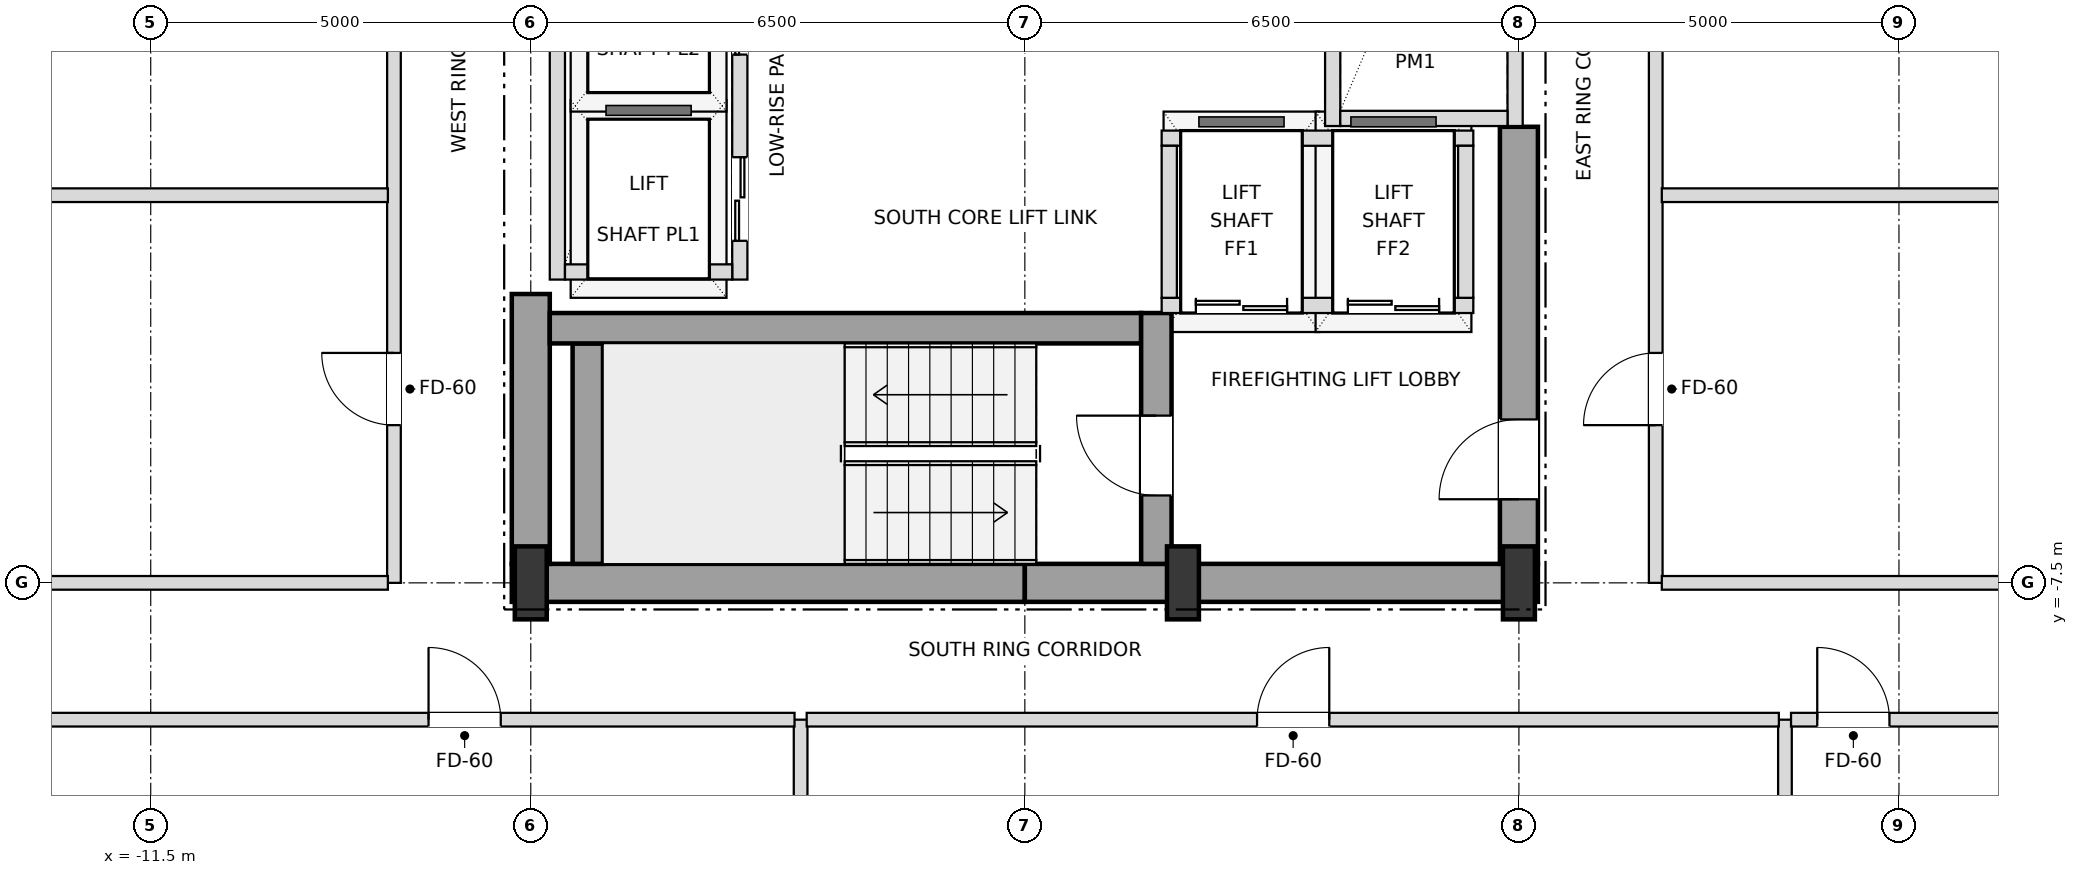
"""IFC4 building model, lengths in metres.
Left out: names, types, materials, properties, quantities, classifications, styles, units other than length and angle.
Written with IfcOpenShell. Run it as: python <this file> out.ifc"""

import sys

from ifc_helpers import new_model, si_unit, direction, frame, frame_2d, origin, origin_2d, place, context, subcontext, project, spatial, rectangle, i_section, extrude, element, fill, save


model = new_model("IFC4")
c1 = context("Model", 3, precision=1e-05, world=origin(), true_north=direction((0.0, 1.0)))
c2 = subcontext(c1, "Body", "Model", "MODEL_VIEW")
j1 = project(units=[si_unit("LENGTHUNIT", "METRE"), si_unit("PLANEANGLEUNIT", "RADIAN")], contexts=[c1])
p1 = place(None, origin())
s1 = spatial("IfcSite", under=j1, at=p1, CompositionType="ELEMENT")
p2 = place(p1, origin())
s2 = spatial("IfcBuilding", under=s1, at=p2, CompositionType="ELEMENT")
p3 = place(p2, frame((0.0, 0.0, 79.2)))
s3 = spatial("IfcBuildingStorey", under=s2, at=p3, CompositionType="ELEMENT", Elevation=79.2)
for number, where, z_axis, x_axis in (
    (1, (-6.5, -7.5, 0.0), (0.0, 0.0, 1.0), (1.0, 0.0, 0.0)),
    (2, (2.08, -7.5, 0.0), (0.0, 0.0, 1.0), (1.0, 0.0, 0.0)),
    (3, (6.5, -7.5, 0.0), (0.0, 0.0, 1.0), (1.0, 0.0, 0.0)),
):
    element("IfcColumn", number, at=place(p3, frame(where, z_axis=z_axis, x_axis=x_axis)), inside=s3, PredefinedType="COLUMN", context=c2, shape_type="SweptSolid", body=[
        extrude(i_section(OverallWidth=0.42, OverallDepth=0.96, WebThickness=0.022, FlangeThickness=0.034, at=origin_2d()), origin(), (0.0, 0.0, 1.0), 3.6),
    ])
for number, where, z_axis, x_axis in (
    (4, (-6.75, -7.5, 0.0), (0.0, 0.0, 1.0), (1.0, 0.0, 0.0)),
    (5, (0.0, -7.5, 0.0), (0.0, 0.0, 1.0), (1.0, 0.0, 0.0)),
):
    element("IfcWall", number, at=place(p3, frame(where, z_axis=z_axis, x_axis=x_axis)), inside=s3, PredefinedType="SHEAR", context=c2, shape_type="SweptSolid", body=[
        extrude(rectangle(XDim=6.75, YDim=0.5, at=frame_2d((3.375, 0.0))), origin(), (0.0, 0.0, 1.0), 3.38),
    ])
p4 = place(p3, frame((-6.5, -7.25, 0.0), z_axis=(0.0, 0.0, 1.0), x_axis=(0.0, 1.0, 0.0)))
e6 = element("IfcWall", 6, at=p4, inside=s3, PredefinedType="SHEAR", context=c2, shape_type="SweptSolid", body=[
    extrude(rectangle(XDim=3.55, YDim=0.5, at=frame_2d((1.775, 0.0))), origin(), (0.0, 0.0, 1.0), 3.38),
])
p5 = place(p3, frame((6.5, -7.25, 0.0), z_axis=(0.0, 0.0, 1.0), x_axis=(0.0, 1.0, 0.0)))
e7 = element("IfcWall", 7, at=p5, inside=s3, PredefinedType="SHEAR", context=c2, shape_type="SweptSolid", body=[
    extrude(rectangle(XDim=5.75, YDim=0.5, at=frame_2d((2.875, 0.0))), origin(), (0.0, 0.0, 1.0), 3.38),
])
p6 = place(p5, frame((0.85, 0.0, 0.0)))
e8 = element("IfcOpeningElement", 8, at=p6, cuts=e7, PredefinedType="OPENING", context=c2, shape_type="SweptSolid", body=[
    extrude(rectangle(XDim=1.05, YDim=2.15, at=frame_2d((0.525, 1.075))), frame((0.0, 0.26, 0.0), z_axis=(0.0, -1.0, 0.0), x_axis=(1.0, 0.0, 0.0)), (0.0, 0.0, 1.0), 0.52),
])
p7 = place(p3, frame((-5.75, -7.25, 0.0), z_axis=(0.0, 0.0, 1.0), x_axis=(0.0, 1.0, 0.0)))
e9 = element("IfcWall", 9, at=p7, inside=s3, PredefinedType="SHEAR", context=c2, shape_type="SweptSolid", body=[
    extrude(rectangle(XDim=2.9, YDim=0.4, at=frame_2d((1.45, 0.0))), origin(), (0.0, 0.0, 1.0), 3.38),
])
p8 = place(p3, frame((-6.25, -4.15, 0.0), z_axis=(0.0, 0.0, 1.0), x_axis=(1.0, 0.0, 0.0)))
e10 = element("IfcWall", 10, at=p8, inside=s3, PredefinedType="SHEAR", context=c2, shape_type="SweptSolid", body=[
    extrude(rectangle(XDim=7.78, YDim=0.4, at=frame_2d((3.89, 0.0))), origin(), (0.0, 0.0, 1.0), 3.38),
])
p9 = place(p3, frame((1.73, -7.25, 0.0), z_axis=(0.0, 0.0, 1.0), x_axis=(0.0, 1.0, 0.0)))
e11 = element("IfcWall", 11, at=p9, inside=s3, PredefinedType="SHEAR", context=c2, shape_type="SweptSolid", body=[
    extrude(rectangle(XDim=3.3, YDim=0.4, at=frame_2d((1.65, 0.0))), origin(), (0.0, 0.0, 1.0), 3.38),
])
p10 = place(p9, frame((0.9, 0.0, 0.0)))
e12 = element("IfcOpeningElement", 12, at=p10, cuts=e11, PredefinedType="OPENING", context=c2, shape_type="SweptSolid", body=[
    extrude(rectangle(XDim=1.05, YDim=2.15, at=frame_2d((0.525, 1.075))), frame((0.0, 0.21, 0.0), z_axis=(0.0, -1.0, 0.0), x_axis=(1.0, 0.0, 0.0)), (0.0, 0.0, 1.0), 0.42),
])
p11 = place(p3, frame((-3.75, -3.51, 0.0), z_axis=(0.0, 0.0, 1.0), x_axis=(0.0, 1.0, 0.0)))
e13 = element("IfcWall", 13, at=p11, inside=s3, PredefinedType="SOLIDWALL", context=c2, shape_type="SweptSolid", body=[
    extrude(rectangle(XDim=7.02, YDim=0.2, at=frame_2d((3.51, 0.0))), origin(), (0.0, 0.0, 1.0), 3.38),
])
p12 = place(p11, frame((0.51, 0.0, 0.0)))
e14 = element("IfcOpeningElement", 14, at=p12, cuts=e13, PredefinedType="OPENING", context=c2, shape_type="SweptSolid", body=[
    extrude(rectangle(XDim=1.1, YDim=2.15, at=frame_2d((0.55, 1.075))), frame((0.0, 0.11, 0.0), z_axis=(0.0, -1.0, 0.0), x_axis=(1.0, 0.0, 0.0)), (0.0, 0.0, 1.0), 0.22),
])
p13 = place(p11, frame((2.96, 0.0, 0.0)))
e15 = element("IfcOpeningElement", 15, at=p13, cuts=e13, PredefinedType="OPENING", context=c2, shape_type="SweptSolid", body=[
    extrude(rectangle(XDim=1.1, YDim=2.15, at=frame_2d((0.55, 1.075))), frame((0.0, 0.11, 0.0), z_axis=(0.0, -1.0, 0.0), x_axis=(1.0, 0.0, 0.0)), (0.0, 0.0, 1.0), 0.22),
])
p14 = place(p11, frame((5.41, 0.0, 0.0)))
e16 = element("IfcOpeningElement", 16, at=p14, cuts=e13, PredefinedType="OPENING", context=c2, shape_type="SweptSolid", body=[
    extrude(rectangle(XDim=1.1, YDim=2.15, at=frame_2d((0.55, 1.075))), frame((0.0, 0.11, 0.0), z_axis=(0.0, -1.0, 0.0), x_axis=(1.0, 0.0, 0.0)), (0.0, 0.0, 1.0), 0.22),
])
p15 = place(p3, frame((-6.15, -3.51, 0.0), z_axis=(0.0, 0.0, 1.0), x_axis=(0.0, 1.0, 0.0)))
e17 = element("IfcWall", 17, at=p15, inside=s3, PredefinedType="SOLIDWALL", context=c2, shape_type="SweptSolid", body=[
    extrude(rectangle(XDim=7.02, YDim=0.2, at=frame_2d((3.51, 0.0))), origin(), (0.0, 0.0, 1.0), 3.38),
])
p16 = place(p3, frame((-6.05, -3.41, 0.0), z_axis=(0.0, 0.0, 1.0), x_axis=(1.0, 0.0, 0.0)))
e18 = element("IfcWall", 18, at=p16, inside=s3, PredefinedType="SOLIDWALL", context=c2, shape_type="SweptSolid", body=[
    extrude(rectangle(XDim=2.2, YDim=0.2, at=frame_2d((1.1, 0.0))), origin(), (0.0, 0.0, 1.0), 3.38),
])
p17 = place(p3, frame((4.05, -1.49, 0.0), z_axis=(0.0, 0.0, 1.0), x_axis=(0.0, 1.0, 0.0)))
e19 = element("IfcWall", 19, at=p17, inside=s3, PredefinedType="SOLIDWALL", context=c2, shape_type="SweptSolid", body=[
    extrude(rectangle(XDim=5.58, YDim=0.2, at=frame_2d((2.79, 0.0))), origin(), (0.0, 0.0, 1.0), 3.38),
])
p18 = place(p3, frame((6.45, -1.49, 0.0), z_axis=(0.0, 0.0, 1.0), x_axis=(0.0, 1.0, 0.0)))
e20 = element("IfcWall", 20, at=p18, inside=s3, PredefinedType="SOLIDWALL", context=c2, shape_type="SweptSolid", body=[
    extrude(rectangle(XDim=5.58, YDim=0.2, at=frame_2d((2.79, 0.0))), origin(), (0.0, 0.0, 1.0), 2.816),
])
p19 = place(p3, frame((4.15, -1.39, 0.0), z_axis=(0.0, 0.0, 1.0), x_axis=(1.0, 0.0, 0.0)))
e21 = element("IfcWall", 21, at=p19, inside=s3, PredefinedType="SOLIDWALL", context=c2, shape_type="SweptSolid", body=[
    extrude(rectangle(XDim=2.2, YDim=0.2, at=frame_2d((1.1, 0.0))), origin(), (0.0, 0.0, 1.0), 3.38),
])
p20 = place(p3, frame((1.8, -3.85, 0.0), z_axis=(0.0, 0.0, 1.0), x_axis=(1.0, 0.0, 0.0)))
e22 = element("IfcWall", 22, at=p20, inside=s3, PredefinedType="SOLIDWALL", context=c2, shape_type="SweptSolid", body=[
    extrude(rectangle(XDim=4.1, YDim=0.2, at=frame_2d((2.05, 0.0))), origin(), (0.0, 0.0, 1.0), 3.38),
])
p21 = place(p20, frame((0.45, 0.0, 0.0)))
e23 = element("IfcOpeningElement", 23, at=p21, cuts=e22, PredefinedType="OPENING", context=c2, shape_type="SweptSolid", body=[
    extrude(rectangle(XDim=1.2, YDim=2.2, at=frame_2d((0.6, 1.1))), frame((0.0, 0.11, 0.0), z_axis=(0.0, -1.0, 0.0), x_axis=(1.0, 0.0, 0.0)), (0.0, 0.0, 1.0), 0.22),
])
p22 = place(p20, frame((2.45, 0.0, 0.0)))
e24 = element("IfcOpeningElement", 24, at=p22, cuts=e22, PredefinedType="OPENING", context=c2, shape_type="SweptSolid", body=[
    extrude(rectangle(XDim=1.2, YDim=2.2, at=frame_2d((0.6, 1.1))), frame((0.0, 0.11, 0.0), z_axis=(0.0, -1.0, 0.0), x_axis=(1.0, 0.0, 0.0)), (0.0, 0.0, 1.0), 0.22),
])
p23 = place(p3, frame((1.8, -1.65, 0.0), z_axis=(0.0, 0.0, 1.0), x_axis=(1.0, 0.0, 0.0)))
e25 = element("IfcWall", 25, at=p23, inside=s3, PredefinedType="SOLIDWALL", context=c2, shape_type="SweptSolid", body=[
    extrude(rectangle(XDim=4.1, YDim=0.2, at=frame_2d((2.05, 0.0))), origin(), (0.0, 0.0, 1.0), 3.38),
])
for number, where, z_axis, x_axis in (
    (26, (1.9, -3.75, 0.0), (0.0, 0.0, 1.0), (0.0, 1.0, 0.0)),
    (27, (5.8, -3.75, 0.0), (0.0, 0.0, 1.0), (0.0, 1.0, 0.0)),
):
    element("IfcWall", number, at=place(p3, frame(where, z_axis=z_axis, x_axis=x_axis)), inside=s3, PredefinedType="SOLIDWALL", context=c2, shape_type="SweptSolid", body=[
        extrude(rectangle(XDim=2.0, YDim=0.2, at=frame_2d((1.0, 0.0))), origin(), (0.0, 0.0, 1.0), 3.38),
    ])
p24 = place(p3, frame((-8.3, -7.5, 0.0), z_axis=(0.0, 0.0, 1.0), x_axis=(0.0, 1.0, 0.0)))
e28 = element("IfcWall", 28, at=p24, inside=s3, PredefinedType="PARTITIONING", context=c2, shape_type="SweptSolid", body=[
    extrude(rectangle(XDim=15.0, YDim=0.18, at=frame_2d((7.5, 0.0))), origin(), (0.0, 0.0, 1.0), 3.38),
])
p25 = place(p24, frame((2.075, 0.0, 0.0)))
e29 = element("IfcOpeningElement", 29, at=p25, cuts=e28, PredefinedType="OPENING", context=c2, shape_type="SweptSolid", body=[
    extrude(rectangle(XDim=0.95, YDim=2.15, at=frame_2d((0.475, 1.075))), frame((0.0, 0.1, 0.0), z_axis=(0.0, -1.0, 0.0), x_axis=(1.0, 0.0, 0.0)), (0.0, 0.0, 1.0), 0.2),
])
p26 = place(p24, frame((8.475, 0.0, 0.0)))
e30 = element("IfcOpeningElement", 30, at=p26, cuts=e28, PredefinedType="OPENING", context=c2, shape_type="SweptSolid", body=[
    extrude(rectangle(XDim=0.95, YDim=2.15, at=frame_2d((0.475, 1.075))), frame((0.0, 0.1, 0.0), z_axis=(0.0, -1.0, 0.0), x_axis=(1.0, 0.0, 0.0)), (0.0, 0.0, 1.0), 0.2),
])
p27 = place(p24, frame((13.425, 0.0, 0.0)))
e31 = element("IfcOpeningElement", 31, at=p27, cuts=e28, PredefinedType="OPENING", context=c2, shape_type="SweptSolid", body=[
    extrude(rectangle(XDim=0.95, YDim=2.15, at=frame_2d((0.475, 1.075))), frame((0.0, 0.1, 0.0), z_axis=(0.0, -1.0, 0.0), x_axis=(1.0, 0.0, 0.0)), (0.0, 0.0, 1.0), 0.2),
])
p28 = place(p3, frame((-2.95, -24.9, 0.0), z_axis=(0.0, 0.0, 1.0), x_axis=(0.0, 1.0, 0.0)))
e32 = element("IfcWall", 32, at=p28, inside=s3, PredefinedType="PARTITIONING", context=c2, shape_type="SweptSolid", body=[
    extrude(rectangle(XDim=15.6, YDim=0.18, at=frame_2d((7.8, 0.0))), origin(), (0.0, 0.0, 1.0), 2.816),
])
p29 = place(p3, frame((8.3, -7.5, 0.0), z_axis=(0.0, 0.0, 1.0), x_axis=(0.0, 1.0, 0.0)))
e33 = element("IfcWall", 33, at=p29, inside=s3, PredefinedType="PARTITIONING", context=c2, shape_type="SweptSolid", body=[
    extrude(rectangle(XDim=15.0, YDim=0.18, at=frame_2d((7.5, 0.0))), origin(), (0.0, 0.0, 1.0), 3.38),
])
p30 = place(p29, frame((2.075, 0.0, 0.0)))
e34 = element("IfcOpeningElement", 34, at=p30, cuts=e33, PredefinedType="OPENING", context=c2, shape_type="SweptSolid", body=[
    extrude(rectangle(XDim=0.95, YDim=2.15, at=frame_2d((0.475, 1.075))), frame((0.0, 0.1, 0.0), z_axis=(0.0, -1.0, 0.0), x_axis=(1.0, 0.0, 0.0)), (0.0, 0.0, 1.0), 0.2),
])
p31 = place(p29, frame((8.475, 0.0, 0.0)))
e35 = element("IfcOpeningElement", 35, at=p31, cuts=e33, PredefinedType="OPENING", context=c2, shape_type="SweptSolid", body=[
    extrude(rectangle(XDim=0.95, YDim=2.15, at=frame_2d((0.475, 1.075))), frame((0.0, 0.1, 0.0), z_axis=(0.0, -1.0, 0.0), x_axis=(1.0, 0.0, 0.0)), (0.0, 0.0, 1.0), 0.2),
])
p32 = place(p29, frame((13.425, 0.0, 0.0)))
e36 = element("IfcOpeningElement", 36, at=p32, cuts=e33, PredefinedType="OPENING", context=c2, shape_type="SweptSolid", body=[
    extrude(rectangle(XDim=0.95, YDim=2.15, at=frame_2d((0.475, 1.075))), frame((0.0, 0.1, 0.0), z_axis=(0.0, -1.0, 0.0), x_axis=(1.0, 0.0, 0.0)), (0.0, 0.0, 1.0), 0.2),
])
p33 = place(p3, frame((10.0, -24.9, 0.0), z_axis=(0.0, 0.0, 1.0), x_axis=(0.0, 1.0, 0.0)))
e37 = element("IfcWall", 37, at=p33, inside=s3, PredefinedType="PARTITIONING", context=c2, shape_type="SweptSolid", body=[
    extrude(rectangle(XDim=15.6, YDim=0.18, at=frame_2d((7.8, 0.0))), origin(), (0.0, 0.0, 1.0), 2.816),
])
p34 = place(p33, frame((6.015, 0.0, 0.0)))
e38 = element("IfcOpeningElement", 38, at=p34, cuts=e37, PredefinedType="OPENING", context=c2, shape_type="SweptSolid", body=[
    extrude(rectangle(XDim=0.95, YDim=2.15, at=frame_2d((0.475, 1.075))), frame((0.0, 0.1, 0.0), z_axis=(0.0, -1.0, 0.0), x_axis=(1.0, 0.0, 0.0)), (0.0, 0.0, 1.0), 0.2),
])
p35 = place(p3, frame((-18.4, -9.3, 0.0), z_axis=(0.0, 0.0, 1.0), x_axis=(1.0, 0.0, 0.0)))
e39 = element("IfcWall", 39, at=p35, inside=s3, PredefinedType="PARTITIONING", context=c2, shape_type="SweptSolid", body=[
    extrude(rectangle(XDim=15.37, YDim=0.18, at=frame_2d((7.685, 0.0))), origin(), (0.0, 0.0, 1.0), 2.816),
])
p36 = place(p35, frame((10.555, 0.0, 0.0)))
e40 = element("IfcOpeningElement", 40, at=p36, cuts=e39, PredefinedType="OPENING", context=c2, shape_type="SweptSolid", body=[
    extrude(rectangle(XDim=0.95, YDim=2.15, at=frame_2d((0.475, 1.075))), frame((0.0, 0.1, 0.0), z_axis=(0.0, -1.0, 0.0), x_axis=(1.0, 0.0, 0.0)), (0.0, 0.0, 1.0), 0.2),
])
p37 = place(p3, frame((-2.87, -9.3, 0.0), z_axis=(0.0, 0.0, 1.0), x_axis=(1.0, 0.0, 0.0)))
e41 = element("IfcWall", 41, at=p37, inside=s3, PredefinedType="PARTITIONING", context=c2, shape_type="SweptSolid", body=[
    extrude(rectangle(XDim=12.79, YDim=0.18, at=frame_2d((6.395, 0.0))), origin(), (0.0, 0.0, 1.0), 2.816),
])
p38 = place(p37, frame((5.925, 0.0, 0.0)))
e42 = element("IfcOpeningElement", 42, at=p38, cuts=e41, PredefinedType="OPENING", context=c2, shape_type="SweptSolid", body=[
    extrude(rectangle(XDim=0.95, YDim=2.15, at=frame_2d((0.475, 1.075))), frame((0.0, 0.1, 0.0), z_axis=(0.0, -1.0, 0.0), x_axis=(1.0, 0.0, 0.0)), (0.0, 0.0, 1.0), 0.2),
])
p39 = place(p3, frame((10.08, -9.3, 0.0), z_axis=(0.0, 0.0, 1.0), x_axis=(1.0, 0.0, 0.0)))
e43 = element("IfcWall", 43, at=p39, inside=s3, PredefinedType="PARTITIONING", context=c2, shape_type="SweptSolid", body=[
    extrude(rectangle(XDim=8.24, YDim=0.18, at=frame_2d((4.12, 0.0))), origin(), (0.0, 0.0, 1.0), 2.816),
])
p40 = place(p39, frame((0.345, 0.0, 0.0)))
e44 = element("IfcOpeningElement", 44, at=p40, cuts=e43, PredefinedType="OPENING", context=c2, shape_type="SweptSolid", body=[
    extrude(rectangle(XDim=0.95, YDim=2.15, at=frame_2d((0.475, 1.075))), frame((0.0, 0.1, 0.0), z_axis=(0.0, -1.0, 0.0), x_axis=(1.0, 0.0, 0.0)), (0.0, 0.0, 1.0), 0.2),
])
for number, where, z_axis, x_axis in (
    (45, (-21.9, -7.5, 0.0), (0.0, 0.0, 1.0), (1.0, 0.0, 0.0)),
    (46, (8.38, -7.5, 0.0), (0.0, 0.0, 1.0), (1.0, 0.0, 0.0)),
):
    element("IfcWall", number, at=place(p3, frame(where, z_axis=z_axis, x_axis=x_axis)), inside=s3, PredefinedType="PARTITIONING", context=c2, shape_type="SweptSolid", body=[
        extrude(rectangle(XDim=13.52, YDim=0.18, at=frame_2d((6.76, 0.0))), origin(), (0.0, 0.0, 1.0), 2.816),
    ])
for number, where, z_axis, x_axis in (
    (47, (-21.82, -2.4, 0.0), (0.0, 0.0, 1.0), (1.0, 0.0, 0.0)),
    (48, (8.38, -2.4, 0.0), (0.0, 0.0, 1.0), (1.0, 0.0, 0.0)),
):
    element("IfcWall", number, at=place(p3, frame(where, z_axis=z_axis, x_axis=x_axis)), inside=s3, PredefinedType="PARTITIONING", context=c2, shape_type="SweptSolid", body=[
        extrude(rectangle(XDim=13.44, YDim=0.18, at=frame_2d((6.72, 0.0))), origin(), (0.0, 0.0, 1.0), 2.816),
    ])
p41 = place(p6, origin())
e49 = element("IfcDoor", 49, at=p41, inside=s3, OperationType="SINGLE_SWING_LEFT", PredefinedType="DOOR", context=c2, shape_type="SweptSolid", body=[
    extrude(rectangle(XDim=1.05, YDim=2.15, at=frame_2d((0.525, 1.075))), frame((0.0, 0.025, 0.0), z_axis=(0.0, -1.0, 0.0), x_axis=(1.0, 0.0, 0.0)), (0.0, 0.0, 1.0), 0.05),
])
fill(e8, e49)
p42 = place(p10, origin())
e50 = element("IfcDoor", 50, at=p42, inside=s3, OperationType="SINGLE_SWING_RIGHT", PredefinedType="DOOR", context=c2, shape_type="SweptSolid", body=[
    extrude(rectangle(XDim=1.05, YDim=2.15, at=frame_2d((0.525, 1.075))), frame((0.0, 0.025, 0.0), z_axis=(0.0, -1.0, 0.0), x_axis=(1.0, 0.0, 0.0)), (0.0, 0.0, 1.0), 0.05),
])
fill(e12, e50)
p43 = place(p12, origin())
e51 = element("IfcDoor", 51, at=p43, inside=s3, OperationType="DOUBLE_DOOR_SLIDING", PredefinedType="DOOR", context=c2, shape_type="SweptSolid", body=[
    extrude(rectangle(XDim=1.1, YDim=2.15, at=frame_2d((0.55, 1.075))), frame((0.0, 0.025, 0.0), z_axis=(0.0, -1.0, 0.0), x_axis=(1.0, 0.0, 0.0)), (0.0, 0.0, 1.0), 0.05),
])
fill(e14, e51)
p44 = place(p13, origin())
e52 = element("IfcDoor", 52, at=p44, inside=s3, OperationType="DOUBLE_DOOR_SLIDING", PredefinedType="DOOR", context=c2, shape_type="SweptSolid", body=[
    extrude(rectangle(XDim=1.1, YDim=2.15, at=frame_2d((0.55, 1.075))), frame((0.0, 0.025, 0.0), z_axis=(0.0, -1.0, 0.0), x_axis=(1.0, 0.0, 0.0)), (0.0, 0.0, 1.0), 0.05),
])
fill(e15, e52)
p45 = place(p21, origin())
e53 = element("IfcDoor", 53, at=p45, inside=s3, OperationType="DOUBLE_DOOR_SLIDING", PredefinedType="DOOR", context=c2, shape_type="SweptSolid", body=[
    extrude(rectangle(XDim=1.2, YDim=2.2, at=frame_2d((0.6, 1.1))), frame((0.0, 0.025, 0.0), z_axis=(0.0, -1.0, 0.0), x_axis=(1.0, 0.0, 0.0)), (0.0, 0.0, 1.0), 0.05),
])
fill(e23, e53)
p46 = place(p22, origin())
e54 = element("IfcDoor", 54, at=p46, inside=s3, OperationType="DOUBLE_DOOR_SLIDING", PredefinedType="DOOR", context=c2, shape_type="SweptSolid", body=[
    extrude(rectangle(XDim=1.2, YDim=2.2, at=frame_2d((0.6, 1.1))), frame((0.0, 0.025, 0.0), z_axis=(0.0, -1.0, 0.0), x_axis=(1.0, 0.0, 0.0)), (0.0, 0.0, 1.0), 0.05),
])
fill(e24, e54)
p47 = place(p40, origin())
e55 = element("IfcDoor", 55, at=p47, inside=s3, OperationType="SINGLE_SWING_LEFT", PredefinedType="DOOR", context=c2, shape_type="SweptSolid", body=[
    extrude(rectangle(XDim=0.95, YDim=2.15, at=frame_2d((0.475, 1.075))), frame((0.0, 0.025, 0.0), z_axis=(0.0, -1.0, 0.0), x_axis=(1.0, 0.0, 0.0)), (0.0, 0.0, 1.0), 0.05),
])
fill(e44, e55)
p48 = place(p36, origin())
e56 = element("IfcDoor", 56, at=p48, inside=s3, OperationType="SINGLE_SWING_LEFT", PredefinedType="DOOR", context=c2, shape_type="SweptSolid", body=[
    extrude(rectangle(XDim=0.95, YDim=2.15, at=frame_2d((0.475, 1.075))), frame((0.0, 0.025, 0.0), z_axis=(0.0, -1.0, 0.0), x_axis=(1.0, 0.0, 0.0)), (0.0, 0.0, 1.0), 0.05),
])
fill(e40, e56)
p49 = place(p38, origin())
e57 = element("IfcDoor", 57, at=p49, inside=s3, OperationType="SINGLE_SWING_RIGHT", PredefinedType="DOOR", context=c2, shape_type="SweptSolid", body=[
    extrude(rectangle(XDim=0.95, YDim=2.15, at=frame_2d((0.475, 1.075))), frame((0.0, 0.025, 0.0), z_axis=(0.0, -1.0, 0.0), x_axis=(1.0, 0.0, 0.0)), (0.0, 0.0, 1.0), 0.05),
])
fill(e42, e57)
p50 = place(p25, origin())
e58 = element("IfcDoor", 58, at=p50, inside=s3, OperationType="SINGLE_SWING_RIGHT", PredefinedType="DOOR", context=c2, shape_type="SweptSolid", body=[
    extrude(rectangle(XDim=0.95, YDim=2.15, at=frame_2d((0.475, 1.075))), frame((0.0, 0.025, 0.0), z_axis=(0.0, -1.0, 0.0), x_axis=(1.0, 0.0, 0.0)), (0.0, 0.0, 1.0), 0.05),
])
fill(e29, e58)
p51 = place(p30, origin())
e59 = element("IfcDoor", 59, at=p51, inside=s3, OperationType="SINGLE_SWING_LEFT", PredefinedType="DOOR", context=c2, shape_type="SweptSolid", body=[
    extrude(rectangle(XDim=0.95, YDim=2.15, at=frame_2d((0.475, 1.075))), frame((0.0, 0.025, 0.0), z_axis=(0.0, -1.0, 0.0), x_axis=(1.0, 0.0, 0.0)), (0.0, 0.0, 1.0), 0.05),
])
fill(e34, e59)
save(model, sys.argv[1])
